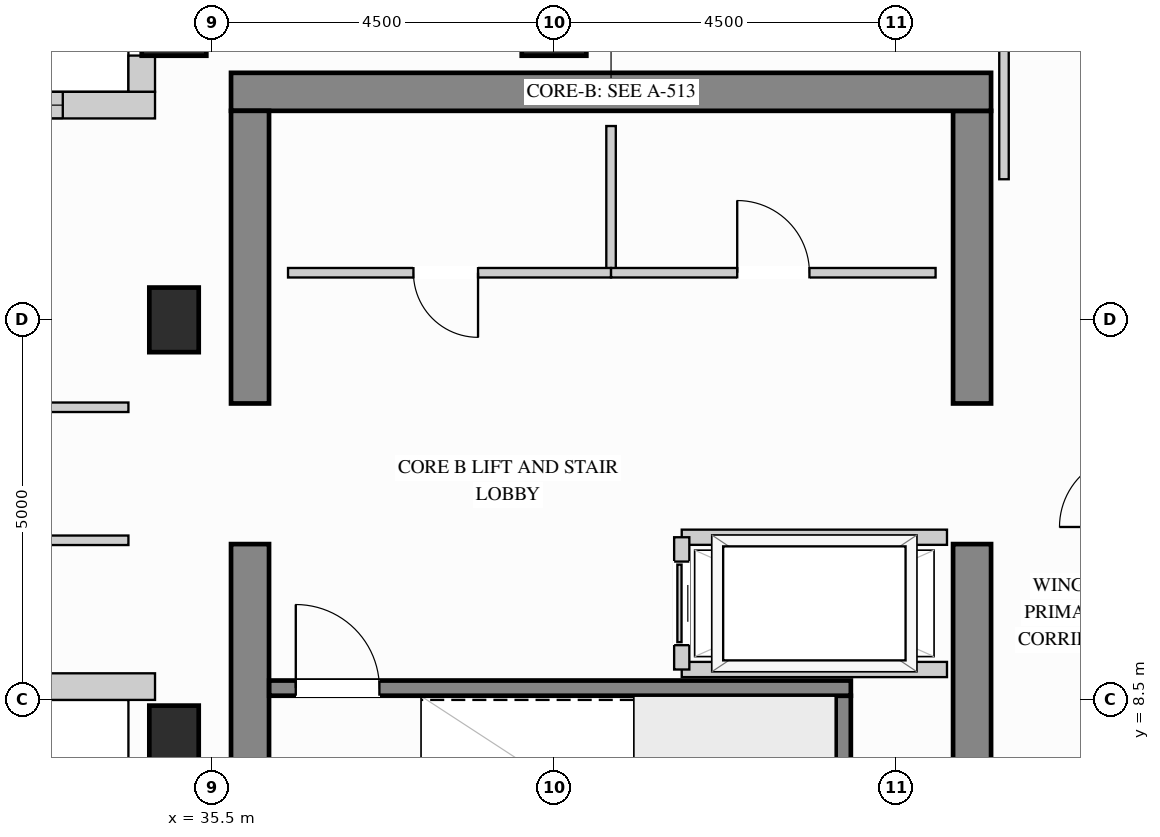
"""IFC4 building model, lengths in metres.
Left out: names, types, materials, properties, quantities, classifications, styles, units other than length and angle.
Written with IfcOpenShell. Run it as: python <this file> out.ifc"""

import sys

from ifc_helpers import new_model, si_unit, direction, frame, frame_2d, origin, origin_2d, place, context, subcontext, project, spatial, rectangle, extrude, source, transform, mapped, element, fill, save


model = new_model("IFC4")
c1 = context("Model", 3, precision=1e-05, world=origin(), true_north=direction((0.0, 1.0)))
c2 = subcontext(c1, "Body", "Model", "MODEL_VIEW")
j1 = project(units=[si_unit("LENGTHUNIT", "METRE"), si_unit("PLANEANGLEUNIT", "RADIAN")], contexts=[c1])
p1 = place(None, origin())
s1 = spatial("IfcSite", under=j1, at=p1, CompositionType="ELEMENT")
p2 = place(p1, origin())
s2 = spatial("IfcBuilding", under=s1, at=p2, CompositionType="ELEMENT")
p3 = place(p2, frame((0.0, 0.0, 226.8)))
s3 = spatial("IfcBuildingStorey", under=s2, at=p3, CompositionType="ELEMENT", Elevation=226.8)
m1 = source(origin(), c2, "Body", "SweptSolid", [
    extrude(rectangle(XDim=0.65, YDim=0.85, at=origin_2d()), origin(), (0.0, 0.0, 1.0), 3.4),
])
for number, where, z_axis, x_axis in (
    (1, (35.0, 13.5, 0.0), (0.0, 0.0, 1.0), (1.0, 0.0, 0.0)),
    (2, (35.0, 8.0, 0.0), (0.0, 0.0, 1.0), (1.0, 0.0, 0.0)),
):
    element("IfcColumn", number, at=place(p3, frame(where, z_axis=z_axis, x_axis=x_axis)), inside=s3, PredefinedType="COLUMN", context=c2, shape_type="MappedRepresentation", body=[
        mapped(m1, transform((0.0, 0.0, 0.0), x_axis=(1.0, 0.0, 0.0), y_axis=(0.0, 1.0, 0.0), z_axis=(0.0, 0.0, 1.0))),
    ])
m2 = source(origin(), c2, "Body", "SweptSolid", [
    extrude(rectangle(XDim=0.85, YDim=0.85, at=origin_2d()), origin(), (0.0, 0.0, 1.0), 3.4),
])
for number, where, z_axis, x_axis in (
    (3, (35.0, 17.4, 0.0), (0.0, 0.0, 1.0), (1.0, 0.0, 0.0)),
    (4, (40.0, 17.4, 0.0), (0.0, 0.0, 1.0), (1.0, 0.0, 0.0)),
):
    element("IfcColumn", number, at=place(p3, frame(where, z_axis=z_axis, x_axis=x_axis)), inside=s3, PredefinedType="COLUMN", context=c2, shape_type="MappedRepresentation", body=[
        mapped(m2, transform((0.0, 0.0, 0.0), x_axis=(1.0, 0.0, 0.0), y_axis=(0.0, 1.0, 0.0), z_axis=(0.0, 0.0, 1.0))),
    ])
m3 = source(origin(), c2, "Body", "SweptSolid", [
    extrude(rectangle(XDim=5.8, YDim=0.5, at=frame_2d((2.9, 0.0))), origin(), (0.0, 0.0, 1.0), 3.4),
])
p4 = place(p3, frame((45.5, 4.75, 0.0), z_axis=(0.0, 0.0, 1.0), x_axis=(0.0, 1.0, 0.0)))
e5 = element("IfcWall", 5, at=p4, inside=s3, PredefinedType="SHEAR", context=c2, shape_type="MappedRepresentation", body=[
    mapped(m3, transform((0.0, 0.0, 0.0), x_axis=(1.0, 0.0, 0.0), y_axis=(0.0, 1.0, 0.0), z_axis=(0.0, 0.0, 1.0))),
])
m4 = source(origin(), c2, "Body", "SweptSolid", [
    extrude(rectangle(XDim=3.85, YDim=0.5, at=frame_2d((1.925, 0.0))), origin(), (0.0, 0.0, 1.0), 3.4),
])
p5 = place(p3, frame((45.5, 12.4, 0.0), z_axis=(0.0, 0.0, 1.0), x_axis=(0.0, 1.0, 0.0)))
e6 = element("IfcWall", 6, at=p5, inside=s3, PredefinedType="SHEAR", context=c2, shape_type="MappedRepresentation", body=[
    mapped(m4, transform((0.0, 0.0, 0.0), x_axis=(1.0, 0.0, 0.0), y_axis=(0.0, 1.0, 0.0), z_axis=(0.0, 0.0, 1.0))),
])
m5 = source(origin(), c2, "Body", "SweptSolid", [
    extrude(rectangle(XDim=10.0, YDim=0.5, at=frame_2d((5.0, 0.0))), origin(), (0.0, 0.0, 1.0), 3.4),
])
p6 = place(p3, frame((35.75, 16.5, 0.0), z_axis=(0.0, 0.0, 1.0), x_axis=(1.0, 0.0, 0.0)))
e7 = element("IfcWall", 7, at=p6, inside=s3, PredefinedType="SHEAR", context=c2, shape_type="MappedRepresentation", body=[
    mapped(m5, transform((0.0, 0.0, 0.0), x_axis=(1.0, 0.0, 0.0), y_axis=(0.0, 1.0, 0.0), z_axis=(0.0, 0.0, 1.0))),
])
p7 = place(p3, frame((36.0, 4.75, 0.0), z_axis=(0.0, 0.0, 1.0), x_axis=(0.0, 1.0, 0.0)))
e8 = element("IfcWall", 8, at=p7, inside=s3, PredefinedType="SHEAR", context=c2, shape_type="MappedRepresentation", body=[
    mapped(m3, transform((0.0, 0.0, 0.0), x_axis=(1.0, 0.0, 0.0), y_axis=(0.0, 1.0, 0.0), z_axis=(0.0, 0.0, 1.0))),
])
p8 = place(p3, frame((36.0, 12.4, 0.0), z_axis=(0.0, 0.0, 1.0), x_axis=(0.0, 1.0, 0.0)))
e9 = element("IfcWall", 9, at=p8, inside=s3, PredefinedType="SHEAR", context=c2, shape_type="MappedRepresentation", body=[
    mapped(m4, transform((0.0, 0.0, 0.0), x_axis=(1.0, 0.0, 0.0), y_axis=(0.0, 1.0, 0.0), z_axis=(0.0, 0.0, 1.0))),
])
p9 = place(p3, frame((19.323, 8.675, 0.0), z_axis=(0.0, 0.0, 1.0), x_axis=(1.0, 0.0, 0.0)))
e10 = element("IfcWall", 10, at=p9, inside=s3, PredefinedType="SOLIDWALL", context=c2, shape_type="SweptSolid", body=[
    extrude(rectangle(XDim=15.427, YDim=0.35, at=frame_2d((7.713, 0.0))), origin(), (0.0, 0.0, 1.0), 3.385),
])
p10 = place(p9, frame((1.672, 0.0, 0.78)))
e11 = element("IfcOpeningElement", 11, at=p10, cuts=e10, PredefinedType="OPENING", context=c2, shape_type="SweptSolid", body=[
    extrude(rectangle(XDim=1.5, YDim=2.0, at=frame_2d((0.75, 1.0))), frame((0.0, 0.185, 0.0), z_axis=(0.0, -1.0, 0.0), x_axis=(1.0, 0.0, 0.0)), (0.0, 0.0, 1.0), 0.37),
])
p11 = place(p9, frame((4.525, 0.0, 0.78)))
e12 = element("IfcOpeningElement", 12, at=p11, cuts=e10, PredefinedType="OPENING", context=c2, shape_type="SweptSolid", body=[
    extrude(rectangle(XDim=1.5, YDim=2.0, at=frame_2d((0.75, 1.0))), frame((0.0, 0.185, 0.0), z_axis=(0.0, -1.0, 0.0), x_axis=(1.0, 0.0, 0.0)), (0.0, 0.0, 1.0), 0.37),
])
p12 = place(p9, frame((9.287, 0.0, 0.78)))
e13 = element("IfcOpeningElement", 13, at=p12, cuts=e10, PredefinedType="OPENING", context=c2, shape_type="SweptSolid", body=[
    extrude(rectangle(XDim=1.5, YDim=2.0, at=frame_2d((0.75, 1.0))), frame((0.0, 0.185, 0.0), z_axis=(0.0, -1.0, 0.0), x_axis=(1.0, 0.0, 0.0)), (0.0, 0.0, 1.0), 0.37),
])
p13 = place(p9, frame((12.197, 0.0, 0.78)))
e14 = element("IfcOpeningElement", 14, at=p13, cuts=e10, PredefinedType="OPENING", context=c2, shape_type="SweptSolid", body=[
    extrude(rectangle(XDim=1.5, YDim=2.0, at=frame_2d((0.75, 1.0))), frame((0.0, 0.185, 0.0), z_axis=(0.0, -1.0, 0.0), x_axis=(1.0, 0.0, 0.0)), (0.0, 0.0, 1.0), 0.37),
])
m6 = source(origin(), c2, "Body", "SweptSolid", [
    extrude(rectangle(XDim=0.479, YDim=0.35, at=frame_2d((0.24, 0.0))), origin(), (0.0, 0.0, 1.0), 3.385),
])
p14 = place(p3, frame((34.575, 16.977, 0.0), z_axis=(0.0, 0.0, 1.0), x_axis=(0.0, -1.0, 0.0)))
e15 = element("IfcWall", 15, at=p14, inside=s3, PredefinedType="SOLIDWALL", context=c2, shape_type="MappedRepresentation", body=[
    mapped(m6, transform((0.0, 0.0, 0.0), x_axis=(1.0, 0.0, 0.0), y_axis=(0.0, 1.0, 0.0), z_axis=(0.0, 0.0, 1.0))),
])
p15 = place(p3, frame((34.75, 16.325, 0.0), z_axis=(0.0, 0.0, 1.0), x_axis=(-1.0, 0.0, 0.0)))
e16 = element("IfcWall", 16, at=p15, inside=s3, PredefinedType="SOLIDWALL", context=c2, shape_type="SweptSolid", body=[
    extrude(rectangle(XDim=3.927, YDim=0.35, at=frame_2d((1.963, 0.0))), origin(), (0.0, 0.0, 1.0), 3.385),
])
p16 = place(p15, frame((1.213, 0.0, 0.78)))
e17 = element("IfcOpeningElement", 17, at=p16, cuts=e16, PredefinedType="OPENING", context=c2, shape_type="SweptSolid", body=[
    extrude(rectangle(XDim=1.5, YDim=2.0, at=frame_2d((0.75, 1.0))), frame((0.0, 0.185, 0.0), z_axis=(0.0, -1.0, 0.0), x_axis=(1.0, 0.0, 0.0)), (0.0, 0.0, 1.0), 0.37),
])
m7 = source(origin(), c2, "Body", "SweptSolid", [
    extrude(rectangle(XDim=1.93, YDim=0.125, at=frame_2d((0.965, 0.0))), origin(), (0.0, 0.0, 1.0), 3.385),
])
p17 = place(p3, frame((40.75, 14.12, 0.0), z_axis=(0.0, 0.0, 1.0), x_axis=(0.0, 1.0, 0.0)))
e18 = element("IfcWall", 18, at=p17, inside=s3, PredefinedType="PARTITIONING", context=c2, shape_type="MappedRepresentation", body=[
    mapped(m7, transform((0.0, 0.0, 0.0), x_axis=(1.0, 0.0, 0.0), y_axis=(0.0, 1.0, 0.0), z_axis=(0.0, 0.0, 1.0))),
])
p18 = place(p3, frame((36.5, 14.12, 0.0), z_axis=(0.0, 0.0, 1.0), x_axis=(1.0, 0.0, 0.0)))
e19 = element("IfcWall", 19, at=p18, inside=s3, PredefinedType="PARTITIONING", context=c2, shape_type="SweptSolid", body=[
    extrude(rectangle(XDim=4.25, YDim=0.125, at=frame_2d((2.125, 0.0))), origin(), (0.0, 0.0, 1.0), 3.385),
])
p19 = place(p18, frame((1.65, 0.0, 0.0)))
e20 = element("IfcOpeningElement", 20, at=p19, cuts=e19, PredefinedType="OPENING", context=c2, shape_type="SweptSolid", body=[
    extrude(rectangle(XDim=0.85, YDim=2.1, at=frame_2d((0.425, 1.05))), frame((0.0, 0.073, 0.0), z_axis=(0.0, -1.0, 0.0), x_axis=(1.0, 0.0, 0.0)), (0.0, 0.0, 1.0), 0.145),
])
p20 = place(p3, frame((40.75, 14.12, 0.0), z_axis=(0.0, 0.0, 1.0), x_axis=(1.0, 0.0, 0.0)))
e21 = element("IfcWall", 21, at=p20, inside=s3, PredefinedType="PARTITIONING", context=c2, shape_type="SweptSolid", body=[
    extrude(rectangle(XDim=4.27, YDim=0.125, at=frame_2d((2.135, 0.0))), origin(), (0.0, 0.0, 1.0), 3.385),
])
p21 = place(p20, frame((1.66, 0.0, 0.0)))
e22 = element("IfcOpeningElement", 22, at=p21, cuts=e21, PredefinedType="OPENING", context=c2, shape_type="SweptSolid", body=[
    extrude(rectangle(XDim=0.95, YDim=2.15, at=frame_2d((0.475, 1.075))), frame((0.0, 0.073, 0.0), z_axis=(0.0, -1.0, 0.0), x_axis=(1.0, 0.0, 0.0)), (0.0, 0.0, 1.0), 0.145),
])
m8 = source(origin(), c2, "Body", "SweptSolid", [
    extrude(rectangle(XDim=2.298, YDim=0.125, at=frame_2d((1.149, 0.0))), origin(), (0.0, 0.0, 1.0), 3.385),
])
p22 = place(p3, frame((45.92, 15.35, 0.0), z_axis=(0.0, 0.0, 1.0), x_axis=(0.0, 1.0, 0.0)))
e23 = element("IfcWall", 23, at=p22, inside=s3, PredefinedType="PARTITIONING", context=c2, shape_type="MappedRepresentation", body=[
    mapped(m8, transform((0.0, 0.0, 0.0), x_axis=(1.0, 0.0, 0.0), y_axis=(0.0, 1.0, 0.0), z_axis=(0.0, 0.0, 1.0))),
])
p23 = place(p3, frame((29.85, 12.35, 0.0), z_axis=(0.0, 0.0, 1.0), x_axis=(1.0, 0.0, 0.0)))
e24 = element("IfcWall", 24, at=p23, inside=s3, PredefinedType="PARTITIONING", context=c2, shape_type="SweptSolid", body=[
    extrude(rectangle(XDim=4.55, YDim=0.125, at=frame_2d((2.275, 0.0))), origin(), (0.0, 0.0, 1.0), 3.385),
])
p24 = place(p23, frame((1.8, 0.0, 0.0)))
e25 = element("IfcOpeningElement", 25, at=p24, cuts=e24, PredefinedType="OPENING", context=c2, shape_type="SweptSolid", body=[
    extrude(rectangle(XDim=0.95, YDim=2.15, at=frame_2d((0.475, 1.075))), frame((0.0, 0.073, 0.0), z_axis=(0.0, -1.0, 0.0), x_axis=(1.0, 0.0, 0.0)), (0.0, 0.0, 1.0), 0.145),
])
p25 = place(p3, frame((26.95, 10.6, 0.0), z_axis=(0.0, 0.0, 1.0), x_axis=(1.0, 0.0, 0.0)))
e26 = element("IfcWall", 26, at=p25, inside=s3, PredefinedType="PARTITIONING", context=c2, shape_type="SweptSolid", body=[
    extrude(rectangle(XDim=7.45, YDim=0.125, at=frame_2d((3.725, 0.0))), origin(), (0.0, 0.0, 1.0), 3.385),
])
p26 = place(p25, frame((4.478, 0.0, 0.0)))
e27 = element("IfcOpeningElement", 27, at=p26, cuts=e26, PredefinedType="OPENING", context=c2, shape_type="SweptSolid", body=[
    extrude(rectangle(XDim=0.95, YDim=2.15, at=frame_2d((0.475, 1.075))), frame((0.0, 0.073, 0.0), z_axis=(0.0, -1.0, 0.0), x_axis=(1.0, 0.0, 0.0)), (0.0, 0.0, 1.0), 0.145),
])
m9 = source(origin(), c2, "Body", "SweptSolid", [
    extrude(rectangle(XDim=3.49, YDim=0.2, at=frame_2d((1.745, 0.0))), origin(), (0.0, 0.0, 1.0), 3.385),
])
for number, where, z_axis, x_axis in (
    (28, (41.68, 10.64, 0.0), (0.0, 0.0, 1.0), (1.0, 0.0, 0.0)),
    (29, (41.68, 8.9, 0.0), (0.0, 0.0, 1.0), (1.0, 0.0, 0.0)),
):
    element("IfcWall", number, at=place(p3, frame(where, z_axis=z_axis, x_axis=x_axis)), inside=s3, PredefinedType="PARTITIONING", context=c2, shape_type="MappedRepresentation", body=[
        mapped(m9, transform((0.0, 0.0, 0.0), x_axis=(1.0, 0.0, 0.0), y_axis=(0.0, 1.0, 0.0), z_axis=(0.0, 0.0, 1.0))),
    ])
p27 = place(p3, frame((41.68, 8.9, 0.0), z_axis=(0.0, 0.0, 1.0), x_axis=(0.0, 1.0, 0.0)))
e30 = element("IfcWall", 30, at=p27, inside=s3, PredefinedType="PARTITIONING", context=c2, shape_type="SweptSolid", body=[
    extrude(rectangle(XDim=1.74, YDim=0.2, at=frame_2d((0.87, 0.0))), origin(), (0.0, 0.0, 1.0), 3.385),
])
p28 = place(p27, frame((0.32, 0.0, 0.0)))
e31 = element("IfcOpeningElement", 31, at=p28, cuts=e30, PredefinedType="OPENING", context=c2, shape_type="SweptSolid", body=[
    extrude(rectangle(XDim=1.1, YDim=2.2, at=frame_2d((0.55, 1.1))), frame((0.0, 0.11, 0.0), z_axis=(0.0, -1.0, 0.0), x_axis=(1.0, 0.0, 0.0)), (0.0, 0.0, 1.0), 0.22),
])
m10 = source(origin(), c2, "Body", "SweptSolid", [
    extrude(rectangle(XDim=3.803, YDim=0.2, at=frame_2d((1.901, 0.0))), origin(), (0.0, 0.0, 1.0), 3.4),
])
p29 = place(p3, frame((43.805, 4.752, 0.0), z_axis=(0.0, 0.0, 1.0), x_axis=(0.0, 1.0, 0.0)))
e32 = element("IfcWall", 32, at=p29, inside=s3, PredefinedType="SHEAR", context=c2, shape_type="MappedRepresentation", body=[
    mapped(m10, transform((0.0, 0.0, 0.0), x_axis=(1.0, 0.0, 0.0), y_axis=(0.0, 1.0, 0.0), z_axis=(0.0, 0.0, 1.0))),
])
p30 = place(p3, frame((36.252, 8.655, 0.0), z_axis=(0.0, 0.0, 1.0), x_axis=(1.0, 0.0, 0.0)))
e33 = element("IfcWall", 33, at=p30, inside=s3, PredefinedType="SHEAR", context=c2, shape_type="SweptSolid", body=[
    extrude(rectangle(XDim=7.653, YDim=0.2, at=frame_2d((3.827, 0.0))), origin(), (0.0, 0.0, 1.0), 3.4),
])
p31 = place(p30, frame((0.35, 0.0, 0.0)))
e34 = element("IfcOpeningElement", 34, at=p31, cuts=e33, PredefinedType="OPENING", context=c2, shape_type="SweptSolid", body=[
    extrude(rectangle(XDim=1.1, YDim=2.15, at=frame_2d((0.55, 1.075))), frame((0.0, 0.11, 0.0), z_axis=(0.0, -1.0, 0.0), x_axis=(1.0, 0.0, 0.0)), (0.0, 0.0, 1.0), 0.22),
])
m11 = source(origin(), c2, "Body", "SweptSolid", [
    extrude(rectangle(XDim=1.1, YDim=2.2, at=frame_2d((0.55, 1.1))), frame((0.0, 0.025, 0.0), z_axis=(0.0, -1.0, 0.0), x_axis=(1.0, 0.0, 0.0)), (0.0, 0.0, 1.0), 0.05),
])
p32 = place(p28, origin())
e35 = element("IfcDoor", 35, at=p32, inside=s3, OperationType="SLIDING_TO_LEFT", PredefinedType="DOOR", context=c2, shape_type="MappedRepresentation", body=[
    mapped(m11, transform((0.0, 0.0, 0.0), x_axis=(1.0, 0.0, 0.0), y_axis=(0.0, 1.0, 0.0), z_axis=(0.0, 0.0, 1.0))),
])
fill(e31, e35)
m12 = source(origin(), c2, "Body", "SweptSolid", [
    extrude(rectangle(XDim=0.95, YDim=2.15, at=frame_2d((0.475, 1.075))), frame((0.0, 0.025, 0.0), z_axis=(0.0, -1.0, 0.0), x_axis=(1.0, 0.0, 0.0)), (0.0, 0.0, 1.0), 0.05),
])
p33 = place(p21, origin())
e36 = element("IfcDoor", 36, at=p33, inside=s3, OperationType="SINGLE_SWING_LEFT", PredefinedType="DOOR", context=c2, shape_type="MappedRepresentation", body=[
    mapped(m12, transform((0.0, 0.0, 0.0), x_axis=(1.0, 0.0, 0.0), y_axis=(0.0, 1.0, 0.0), z_axis=(0.0, 0.0, 1.0))),
])
fill(e22, e36)
m13 = source(origin(), c2, "Body", "SweptSolid", [
    extrude(rectangle(XDim=0.85, YDim=2.1, at=frame_2d((0.425, 1.05))), frame((0.0, 0.025, 0.0), z_axis=(0.0, -1.0, 0.0), x_axis=(1.0, 0.0, 0.0)), (0.0, 0.0, 1.0), 0.05),
])
p34 = place(p19, origin())
e37 = element("IfcDoor", 37, at=p34, inside=s3, OperationType="SINGLE_SWING_RIGHT", PredefinedType="DOOR", context=c2, shape_type="MappedRepresentation", body=[
    mapped(m13, transform((0.0, 0.0, 0.0), x_axis=(1.0, 0.0, 0.0), y_axis=(0.0, 1.0, 0.0), z_axis=(0.0, 0.0, 1.0))),
])
fill(e20, e37)
m14 = source(origin(), c2, "Body", "SweptSolid", [
    extrude(rectangle(XDim=1.1, YDim=2.15, at=frame_2d((0.55, 1.075))), frame((0.0, 0.025, 0.0), z_axis=(0.0, -1.0, 0.0), x_axis=(1.0, 0.0, 0.0)), (0.0, 0.0, 1.0), 0.05),
])
p35 = place(p31, origin())
e38 = element("IfcDoor", 38, at=p35, inside=s3, OperationType="SINGLE_SWING_LEFT", PredefinedType="DOOR", context=c2, shape_type="MappedRepresentation", body=[
    mapped(m14, transform((0.0, 0.0, 0.0), x_axis=(1.0, 0.0, 0.0), y_axis=(0.0, 1.0, 0.0), z_axis=(0.0, 0.0, 1.0))),
])
fill(e34, e38)
m15 = source(origin(), c2, "Body", "SweptSolid", [
    extrude(rectangle(XDim=1.5, YDim=2.0, at=frame_2d((0.75, 1.0))), frame((0.0, 0.03, 0.0), z_axis=(0.0, -1.0, 0.0), x_axis=(1.0, 0.0, 0.0)), (0.0, 0.0, 1.0), 0.06),
])
p36 = place(p16, origin())
e39 = element("IfcWindow", 39, at=p36, inside=s3, PartitioningType="SINGLE_PANEL", PredefinedType="WINDOW", context=c2, shape_type="MappedRepresentation", body=[
    mapped(m15, transform((0.0, 0.0, 0.0), x_axis=(1.0, 0.0, 0.0), y_axis=(0.0, 1.0, 0.0), z_axis=(0.0, 0.0, 1.0))),
])
fill(e17, e39)
save(model, sys.argv[1])
